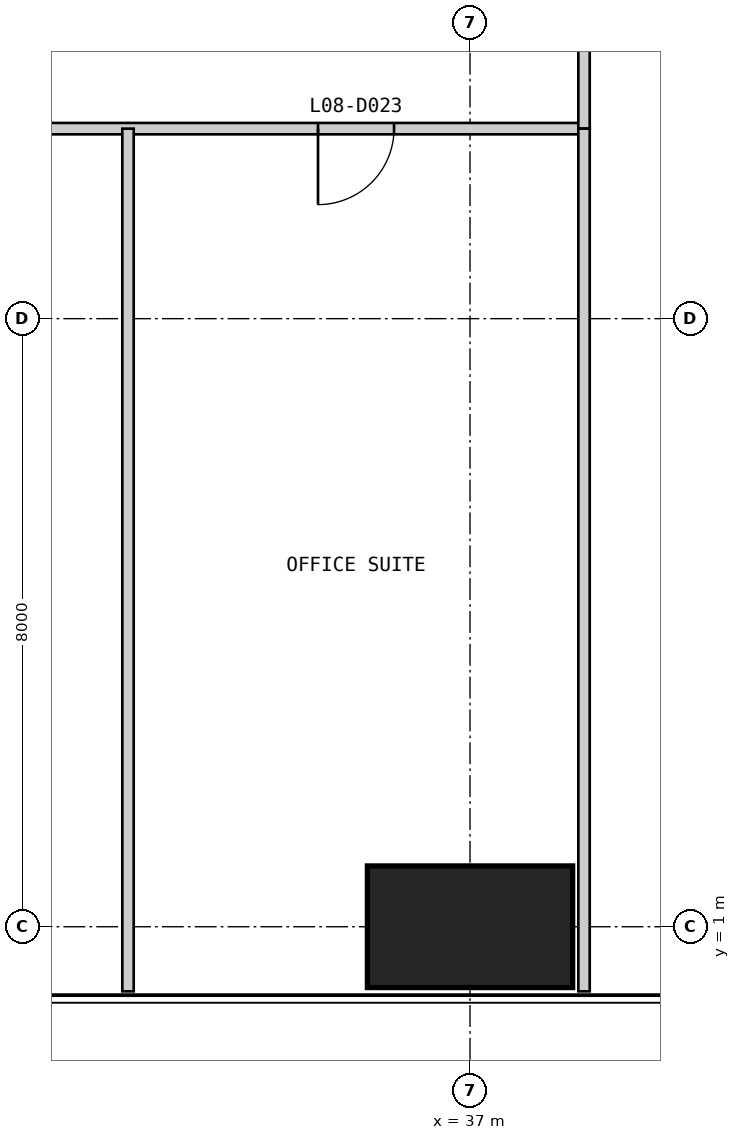
"""IFC4 building model, lengths in metres.
Left out: names, types, materials, properties, quantities, classifications, styles, units other than length and angle.
Written with IfcOpenShell. Run it as: python <this file> out.ifc"""

import sys

from ifc_helpers import new_model, si_unit, direction, frame, frame_2d, origin, origin_2d, place, context, subcontext, project, spatial, rectangle, extrude, element, fill, save


model = new_model("IFC4")
c1 = context("Model", 3, precision=1e-05, world=origin(), true_north=direction((0.0, 1.0)))
c2 = subcontext(c1, "Body", "Model", "MODEL_VIEW")
j1 = project(units=[si_unit("LENGTHUNIT", "METRE"), si_unit("PLANEANGLEUNIT", "RADIAN")], contexts=[c1])
p1 = place(None, origin())
s1 = spatial("IfcSite", under=j1, at=p1, CompositionType="ELEMENT")
p2 = place(p1, origin())
s2 = spatial("IfcBuilding", under=s1, at=p2, CompositionType="ELEMENT")
p3 = place(p2, frame((0.0, 0.0, 39.0)))
s3 = spatial("IfcBuildingStorey", under=s2, at=p3, CompositionType="ELEMENT", Elevation=39.0)
p4 = place(p3, frame((37.0, 1.0, 0.0), z_axis=(0.0, 0.0, 1.0), x_axis=(1.0, 0.0, 0.0)))
e1 = element("IfcColumn", 1, at=p4, inside=s3, PredefinedType="COLUMN", context=c2, shape_type="SweptSolid", body=[
    extrude(rectangle(XDim=2.7, YDim=1.6, at=origin_2d()), origin(), (0.0, 0.0, 1.0), 4.0),
])
p5 = place(p3, frame((11.5, 11.5, 0.0), z_axis=(0.0, 0.0, 1.0), x_axis=(1.0, 0.0, 0.0)))
e2 = element("IfcWall", 2, at=p5, inside=s3, PredefinedType="PARTITIONING", context=c2, shape_type="SweptSolid", body=[
    extrude(rectangle(XDim=27.0, YDim=0.15, at=frame_2d((13.5, 0.0))), origin(), (0.0, 0.0, 1.0), 3.85),
])
p6 = place(p5, frame((4.0, 0.0, 0.0)))
e3 = element("IfcOpeningElement", 3, at=p6, cuts=e2, PredefinedType="OPENING", context=c2, shape_type="SweptSolid", body=[
    extrude(rectangle(XDim=1.0, YDim=2.2, at=frame_2d((0.5, 1.1))), frame((0.0, 0.085, 0.0), z_axis=(0.0, -1.0, 0.0), x_axis=(1.0, 0.0, 0.0)), (0.0, 0.0, 1.0), 0.17),
])
p7 = place(p5, frame((10.0, 0.0, 0.0)))
e4 = element("IfcOpeningElement", 4, at=p7, cuts=e2, PredefinedType="OPENING", context=c2, shape_type="SweptSolid", body=[
    extrude(rectangle(XDim=1.0, YDim=2.2, at=frame_2d((0.5, 1.1))), frame((0.0, 0.085, 0.0), z_axis=(0.0, -1.0, 0.0), x_axis=(1.0, 0.0, 0.0)), (0.0, 0.0, 1.0), 0.17),
])
p8 = place(p5, frame((17.5, 0.0, 0.0)))
e5 = element("IfcOpeningElement", 5, at=p8, cuts=e2, PredefinedType="OPENING", context=c2, shape_type="SweptSolid", body=[
    extrude(rectangle(XDim=1.0, YDim=2.2, at=frame_2d((0.5, 1.1))), frame((0.0, 0.085, 0.0), z_axis=(0.0, -1.0, 0.0), x_axis=(1.0, 0.0, 0.0)), (0.0, 0.0, 1.0), 0.17),
])
p9 = place(p5, frame((23.5, 0.0, 0.0)))
e6 = element("IfcOpeningElement", 6, at=p9, cuts=e2, PredefinedType="OPENING", context=c2, shape_type="SweptSolid", body=[
    extrude(rectangle(XDim=1.0, YDim=2.2, at=frame_2d((0.5, 1.1))), frame((0.0, 0.085, 0.0), z_axis=(0.0, -1.0, 0.0), x_axis=(1.0, 0.0, 0.0)), (0.0, 0.0, 1.0), 0.17),
])
p10 = place(p3, frame((32.5, 0.15, 0.0), z_axis=(0.0, 0.0, 1.0), x_axis=(0.0, 1.0, 0.0)))
e7 = element("IfcWall", 7, at=p10, inside=s3, PredefinedType="PARTITIONING", context=c2, shape_type="SweptSolid", body=[
    extrude(rectangle(XDim=11.35, YDim=0.15, at=frame_2d((5.675, 0.0))), origin(), (0.0, 0.0, 1.0), 3.85),
])
p11 = place(p3, frame((38.5, 11.5, 0.0), z_axis=(0.0, 0.0, 1.0), x_axis=(0.0, 1.0, 0.0)))
e8 = element("IfcWall", 8, at=p11, inside=s3, PredefinedType="PARTITIONING", context=c2, shape_type="SweptSolid", body=[
    extrude(rectangle(XDim=27.0, YDim=0.15, at=frame_2d((13.5, 0.0))), origin(), (0.0, 0.0, 1.0), 3.85),
])
p12 = place(p11, frame((11.5, 0.0, 0.0)))
e9 = element("IfcOpeningElement", 9, at=p12, cuts=e8, PredefinedType="OPENING", context=c2, shape_type="SweptSolid", body=[
    extrude(rectangle(XDim=1.0, YDim=2.2, at=frame_2d((0.5, 1.1))), frame((0.0, 0.085, 0.0), z_axis=(0.0, -1.0, 0.0), x_axis=(1.0, 0.0, 0.0)), (0.0, 0.0, 1.0), 0.17),
])
p13 = place(p3, frame((38.5, 0.15, 0.0), z_axis=(0.0, 0.0, 1.0), x_axis=(0.0, 1.0, 0.0)))
e10 = element("IfcWall", 10, at=p13, inside=s3, PredefinedType="PARTITIONING", context=c2, shape_type="SweptSolid", body=[
    extrude(rectangle(XDim=11.35, YDim=0.15, at=frame_2d((5.675, 0.0))), origin(), (0.0, 0.0, 1.0), 3.85),
])
p14 = place(p9, frame((1.0, 0.0, 0.0), z_axis=(0.0, 0.0, 1.0), x_axis=(-1.0, 0.0, 0.0)))
e11 = element("IfcDoor", 11, at=p14, inside=s3, OperationType="SINGLE_SWING_RIGHT", PredefinedType="DOOR", context=c2, shape_type="SweptSolid", body=[
    extrude(rectangle(XDim=1.0, YDim=2.2, at=frame_2d((0.5, 1.1))), frame((0.0, 0.025, 0.0), z_axis=(0.0, -1.0, 0.0), x_axis=(1.0, 0.0, 0.0)), (0.0, 0.0, 1.0), 0.05),
])
fill(e6, e11)
save(model, sys.argv[1])
